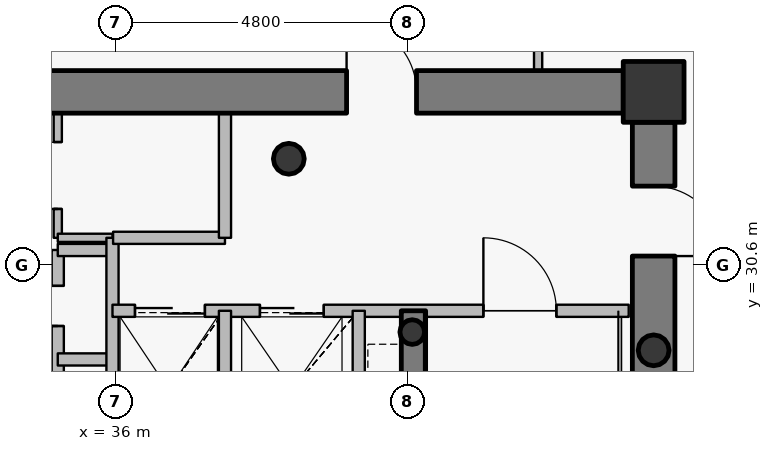
"""IFC4 building model, lengths in metres.
Left out: names, types, materials, properties, quantities, classifications, styles, units other than length and angle.
Written with IfcOpenShell. Run it as: python <this file> out.ifc"""

import sys

from ifc_helpers import new_model, si_unit, direction, frame, frame_2d, origin, origin_2d, place, context, subcontext, project, spatial, rectangle, hollow_circle, extrude, source, transform, mapped, element, fill, save


model = new_model("IFC4")
c1 = context("Model", 3, precision=1e-05, world=origin(), true_north=direction((0.0, 1.0)))
c2 = subcontext(c1, "Body", "Model", "MODEL_VIEW")
j1 = project(units=[si_unit("LENGTHUNIT", "METRE"), si_unit("PLANEANGLEUNIT", "RADIAN")], contexts=[c1])
p1 = place(None, origin())
s1 = spatial("IfcSite", under=j1, at=p1, CompositionType="ELEMENT")
p2 = place(p1, origin())
s2 = spatial("IfcBuilding", under=s1, at=p2, CompositionType="ELEMENT")
p3 = place(p2, frame((0.0, 0.0, 318.0)))
s3 = spatial("IfcBuildingStorey", under=s2, at=p3, CompositionType="ELEMENT", Elevation=318.0)
p4 = place(p3, frame((44.85, 33.45, 0.0), z_axis=(0.0, 0.0, 1.0), x_axis=(1.0, 0.0, 0.0)))
e1 = element("IfcColumn", 1, at=p4, inside=s3, PredefinedType="COLUMN", context=c2, shape_type="SweptSolid", body=[
    extrude(rectangle(XDim=1.0, YDim=1.0, at=origin_2d()), origin(), (0.0, 0.0, 1.0), 6.0),
])
p5 = place(p3, frame((38.85, 32.35, 0.0), z_axis=(0.0, 0.0, 1.0), x_axis=(1.0, 0.0, 0.0)))
e2 = element("IfcColumn", 2, at=p5, inside=s3, PredefinedType="COLUMN", context=c2, shape_type="SweptSolid", body=[
    extrude(hollow_circle(Radius=0.254, WallThickness=0.02, at=origin_2d()), origin(), (0.0, 0.0, 1.0), 6.0),
])
p6 = place(p3, frame((40.88, 29.5, 0.0), z_axis=(0.0, 0.0, 1.0), x_axis=(1.0, 0.0, 0.0)))
e3 = element("IfcColumn", 3, at=p6, inside=s3, PredefinedType="COLUMN", context=c2, shape_type="SweptSolid", body=[
    extrude(hollow_circle(Radius=0.203, WallThickness=0.016, at=origin_2d()), origin(), (0.0, 0.0, 1.0), 6.0),
])
p7 = place(p3, frame((27.65, 33.45, 0.0), z_axis=(0.0, 0.0, 1.0), x_axis=(1.0, 0.0, 0.0)))
e4 = element("IfcWall", 4, at=p7, inside=s3, PredefinedType="SHEAR", context=c2, shape_type="SweptSolid", body=[
    extrude(rectangle(XDim=16.7, YDim=0.7, at=frame_2d((8.35, 0.0))), origin(), (0.0, 0.0, 1.0), 5.3),
])
p8 = place(p7, frame((12.15, 0.0, 0.0)))
e5 = element("IfcOpeningElement", 5, at=p8, cuts=e4, PredefinedType="OPENING", context=c2, shape_type="SweptSolid", body=[
    extrude(rectangle(XDim=1.15, YDim=2.15, at=origin_2d()), frame((0.575, 0.36, 1.075), z_axis=(0.0, -1.0, 0.0), x_axis=(1.0, 0.0, 0.0)), (0.0, 0.0, 1.0), 0.72),
])
p9 = place(p3, frame((44.85, 32.95, 0.0), z_axis=(0.0, 0.0, 1.0), x_axis=(0.0, -1.0, 0.0)))
e6 = element("IfcWall", 6, at=p9, inside=s3, PredefinedType="SHEAR", context=c2, shape_type="SweptSolid", body=[
    extrude(rectangle(XDim=11.9, YDim=0.7, at=frame_2d((5.95, 0.0))), origin(), (0.0, 0.0, 1.0), 5.3),
])
p10 = place(p9, frame((1.05, 0.0, 0.0)))
e7 = element("IfcOpeningElement", 7, at=p10, cuts=e6, PredefinedType="OPENING", context=c2, shape_type="SweptSolid", body=[
    extrude(rectangle(XDim=1.15, YDim=2.15, at=origin_2d()), frame((0.575, 0.36, 1.075), z_axis=(0.0, -1.0, 0.0), x_axis=(1.0, 0.0, 0.0)), (0.0, 0.0, 1.0), 0.72),
])
p11 = place(p3, frame((40.9, 27.25, 0.0), z_axis=(0.0, 0.0, 1.0), x_axis=(0.0, 1.0, 0.0)))
e8 = element("IfcWall", 8, at=p11, inside=s3, PredefinedType="SHEAR", context=c2, shape_type="SweptSolid", body=[
    extrude(rectangle(XDim=2.6, YDim=0.4, at=frame_2d((1.3, 0.0))), origin(), (0.0, 0.0, 1.0), 5.35),
])
p12 = place(p3, frame((44.85, 29.2, 0.0), z_axis=(0.0, 0.0, 1.0), x_axis=(1.0, 0.0, 0.0)))
e9 = element("IfcColumn", 9, at=p12, inside=s3, PredefinedType="COLUMN", context=c2, shape_type="SweptSolid", body=[
    extrude(hollow_circle(Radius=0.254, WallThickness=0.02, at=origin_2d()), origin(), (0.0, 0.0, 1.0), 6.0),
])
p13 = place(p3, frame((35.05, 27.25, 0.0), z_axis=(0.0, 0.0, 1.0), x_axis=(0.0, 1.0, 0.0)))
e10 = element("IfcWall", 10, at=p13, inside=s3, PredefinedType="PARTITIONING", context=c2, shape_type="SweptSolid", body=[
    extrude(rectangle(XDim=3.6, YDim=0.2, at=frame_2d((1.8, 0.0))), origin(), (0.0, 0.0, 1.0), 5.75),
])
p14 = place(p13, frame((0.59, 0.0, 0.0)))
e11 = element("IfcOpeningElement", 11, at=p14, cuts=e10, PredefinedType="OPENING", context=c2, shape_type="SweptSolid", body=[
    extrude(rectangle(XDim=0.66, YDim=2.05, at=origin_2d()), frame((0.33, 0.11, 1.025), z_axis=(0.0, -1.0, 0.0), x_axis=(1.0, 0.0, 0.0)), (0.0, 0.0, 1.0), 0.22),
])
p15 = place(p13, frame((2.35, 0.0, 0.0)))
e12 = element("IfcOpeningElement", 12, at=p15, cuts=e10, PredefinedType="OPENING", context=c2, shape_type="SweptSolid", body=[
    extrude(rectangle(XDim=0.66, YDim=2.05, at=origin_2d()), frame((0.33, 0.11, 1.025), z_axis=(0.0, -1.0, 0.0), x_axis=(1.0, 0.0, 0.0)), (0.0, 0.0, 1.0), 0.22),
])
for number, where, z_axis, x_axis in (
    (13, (35.05, 29.05, 0.0), (0.0, 0.0, 1.0), (1.0, 0.0, 0.0)),
    (14, (35.05, 30.85, 0.0), (0.0, 0.0, 1.0), (1.0, 0.0, 0.0)),
):
    element("IfcWall", number, at=place(p3, frame(where, z_axis=z_axis, x_axis=x_axis)), inside=s3, PredefinedType="PARTITIONING", context=c2, shape_type="SweptSolid", body=[
        extrude(rectangle(XDim=0.9, YDim=0.2, at=frame_2d((0.45, 0.0))), origin(), (0.0, 0.0, 1.0), 5.75),
    ])
p16 = place(p3, frame((35.05, 31.05, 0.0), z_axis=(0.0, 0.0, 1.0), x_axis=(0.0, 1.0, 0.0)))
e15 = element("IfcWall", 15, at=p16, inside=s3, PredefinedType="PARTITIONING", context=c2, shape_type="SweptSolid", body=[
    extrude(rectangle(XDim=2.05, YDim=0.135, at=frame_2d((1.025, 0.0))), origin(), (0.0, 0.0, 1.0), 5.335),
])
p17 = place(p16, frame((0.475, 0.0, 0.0)))
e16 = element("IfcOpeningElement", 16, at=p17, cuts=e15, PredefinedType="OPENING", context=c2, shape_type="SweptSolid", body=[
    extrude(rectangle(XDim=1.1, YDim=2.15, at=origin_2d()), frame((0.55, 0.078, 1.075), z_axis=(0.0, -1.0, 0.0), x_axis=(1.0, 0.0, 0.0)), (0.0, 0.0, 1.0), 0.155),
])
p18 = place(p3, frame((35.05, 31.05, 0.0), z_axis=(0.0, 0.0, 1.0), x_axis=(1.0, 0.0, 0.0)))
e17 = element("IfcWall", 17, at=p18, inside=s3, PredefinedType="PARTITIONING", context=c2, shape_type="SweptSolid", body=[
    extrude(rectangle(XDim=0.9, YDim=0.135, at=frame_2d((0.45, 0.0))), origin(), (0.0, 0.0, 1.0), 5.75),
])
p19 = place(p3, frame((35.95, 27.25, 0.0), z_axis=(0.0, 0.0, 1.0), x_axis=(0.0, 1.0, 0.0)))
e18 = element("IfcWall", 18, at=p19, inside=s3, PredefinedType="PARTITIONING", context=c2, shape_type="SweptSolid", body=[
    extrude(rectangle(XDim=3.8, YDim=0.2, at=frame_2d((1.9, 0.0))), origin(), (0.0, 0.0, 1.0), 5.75),
])
p20 = place(p3, frame((35.95, 29.85, 0.0), z_axis=(0.0, 0.0, 1.0), x_axis=(1.0, 0.0, 0.0)))
e19 = element("IfcWall", 19, at=p20, inside=s3, PredefinedType="PARTITIONING", context=c2, shape_type="SweptSolid", body=[
    extrude(rectangle(XDim=8.49, YDim=0.2, at=frame_2d((4.245, 0.0))), origin(), (0.0, 0.0, 1.0), 5.335),
])
p21 = place(p20, frame((6.1, 0.0, 0.0)))
e20 = element("IfcOpeningElement", 20, at=p21, cuts=e19, PredefinedType="OPENING", context=c2, shape_type="SweptSolid", body=[
    extrude(rectangle(XDim=1.2, YDim=2.15, at=origin_2d()), frame((0.6, 0.11, 1.075), z_axis=(0.0, -1.0, 0.0), x_axis=(1.0, 0.0, 0.0)), (0.0, 0.0, 1.0), 0.22),
])
p22 = place(p20, frame((0.37, 0.0, 0.0)))
e21 = element("IfcOpeningElement", 21, at=p22, cuts=e19, PredefinedType="OPENING", context=c2, shape_type="SweptSolid", body=[
    extrude(rectangle(XDim=1.15, YDim=2.15, at=origin_2d()), frame((0.575, 0.11, 1.075), z_axis=(0.0, -1.0, 0.0), x_axis=(1.0, 0.0, 0.0)), (0.0, 0.0, 1.0), 0.22),
])
p23 = place(p20, frame((2.425, 0.0, 0.0)))
e22 = element("IfcOpeningElement", 22, at=p23, cuts=e19, PredefinedType="OPENING", context=c2, shape_type="SweptSolid", body=[
    extrude(rectangle(XDim=1.05, YDim=2.15, at=origin_2d()), frame((0.525, 0.11, 1.075), z_axis=(0.0, -1.0, 0.0), x_axis=(1.0, 0.0, 0.0)), (0.0, 0.0, 1.0), 0.22),
])
p24 = place(p3, frame((35.96, 31.05, 0.0), z_axis=(0.0, 0.0, 1.0), x_axis=(1.0, 0.0, 0.0)))
e23 = element("IfcWall", 23, at=p24, inside=s3, PredefinedType="PARTITIONING", context=c2, shape_type="SweptSolid", body=[
    extrude(rectangle(XDim=1.84, YDim=0.2, at=frame_2d((0.92, 0.0))), origin(), (0.0, 0.0, 1.0), 5.75),
])
p25 = place(p3, frame((37.8, 27.25, 0.0), z_axis=(0.0, 0.0, 1.0), x_axis=(0.0, 1.0, 0.0)))
e24 = element("IfcWall", 24, at=p25, inside=s3, PredefinedType="PARTITIONING", context=c2, shape_type="SweptSolid", body=[
    extrude(rectangle(XDim=2.6, YDim=0.2, at=frame_2d((1.3, 0.0))), origin(), (0.0, 0.0, 1.0), 5.75),
])
p26 = place(p3, frame((37.8, 31.05, 0.0), z_axis=(0.0, 0.0, 1.0), x_axis=(0.0, 1.0, 0.0)))
e25 = element("IfcWall", 25, at=p26, inside=s3, PredefinedType="PARTITIONING", context=c2, shape_type="SweptSolid", body=[
    extrude(rectangle(XDim=2.05, YDim=0.2, at=frame_2d((1.025, 0.0))), origin(), (0.0, 0.0, 1.0), 5.335),
])
p27 = place(p3, frame((40.0, 25.45, 0.0), z_axis=(0.0, 0.0, 1.0), x_axis=(0.0, 1.0, 0.0)))
e26 = element("IfcWall", 26, at=p27, inside=s3, PredefinedType="PARTITIONING", context=c2, shape_type="SweptSolid", body=[
    extrude(rectangle(XDim=4.4, YDim=0.2, at=frame_2d((2.2, 0.0))), origin(), (0.0, 0.0, 1.0), 5.75),
])
p28 = place(p3, frame((42.95, 33.8, 0.0), z_axis=(0.0, 0.0, 1.0), x_axis=(0.0, 1.0, 0.0)))
e27 = element("IfcWall", 27, at=p28, inside=s3, PredefinedType="PARTITIONING", context=c2, shape_type="SweptSolid", body=[
    extrude(rectangle(XDim=6.537, YDim=0.135, at=frame_2d((3.269, 0.0))), origin(), (0.0, 0.0, 1.0), 4.235),
])
p29 = place(p28, frame((0.92, 0.0, 0.0)))
e28 = element("IfcOpeningElement", 28, at=p29, cuts=e27, PredefinedType="OPENING", context=c2, shape_type="SweptSolid", body=[
    extrude(rectangle(XDim=1.1, YDim=2.15, at=origin_2d()), frame((0.55, 0.078, 1.075), z_axis=(0.0, -1.0, 0.0), x_axis=(1.0, 0.0, 0.0)), (0.0, 0.0, 1.0), 0.155),
])
p30 = place(p3, frame((45.2, 32.96, 0.0), z_axis=(0.0, 0.0, 1.0), x_axis=(0.0, 1.0, 0.0)))
e29 = element("IfcWall", 29, at=p30, inside=s3, PredefinedType="PARTITIONING", context=c2, shape_type="SweptSolid", body=[
    extrude(rectangle(XDim=0.84, YDim=0.135, at=frame_2d((0.42, 0.0))), origin(), (0.0, 0.0, 1.0), 2.832),
])
p31 = place(p3, frame((44.893, 33.8, 0.0), z_axis=(0.0, 0.0, 1.0), x_axis=(-1.0, 0.0, 0.0)))
e30 = element("IfcWall", 30, at=p31, inside=s3, PredefinedType="PARTITIONING", context=c2, shape_type="SweptSolid", body=[
    extrude(rectangle(XDim=0.532, YDim=0.135, at=frame_2d((0.266, 0.0))), origin(), (0.0, 0.0, 1.0), 4.235),
])
m1 = source(origin(), c2, "Body", "SweptSolid", [
    extrude(rectangle(XDim=1.15, YDim=2.15, at=origin_2d()), frame((0.575, 0.025, 1.075), z_axis=(0.0, -1.0, 0.0), x_axis=(1.0, 0.0, 0.0)), (0.0, 0.0, 1.0), 0.05),
])
p32 = place(p8, origin())
e31 = element("IfcDoor", 31, at=p32, inside=s3, OperationType="SINGLE_SWING_LEFT", PredefinedType="DOOR", context=c2, shape_type="MappedRepresentation", body=[
    mapped(m1, transform((0.0, 0.0, 0.0), x_axis=(1.0, 0.0, 0.0), y_axis=(0.0, 1.0, 0.0), z_axis=(0.0, 0.0, 1.0), scale=1.0)),
])
fill(e5, e31)
p33 = place(p10, origin())
e32 = element("IfcDoor", 32, at=p33, inside=s3, OperationType="SINGLE_SWING_RIGHT", PredefinedType="DOOR", context=c2, shape_type="MappedRepresentation", body=[
    mapped(m1, transform((0.0, 0.0, 0.0), x_axis=(1.0, 0.0, 0.0), y_axis=(0.0, 1.0, 0.0), z_axis=(0.0, 0.0, 1.0), scale=1.0)),
])
fill(e7, e32)
m2 = source(origin(), c2, "Body", "SweptSolid", [
    extrude(rectangle(XDim=1.2, YDim=2.15, at=origin_2d()), frame((0.6, 0.025, 1.075), z_axis=(0.0, -1.0, 0.0), x_axis=(1.0, 0.0, 0.0)), (0.0, 0.0, 1.0), 0.05),
])
p34 = place(p21, origin())
e33 = element("IfcDoor", 33, at=p34, inside=s3, OperationType="SINGLE_SWING_LEFT", PredefinedType="DOOR", context=c2, shape_type="MappedRepresentation", body=[
    mapped(m2, transform((0.0, 0.0, 0.0), x_axis=(1.0, 0.0, 0.0), y_axis=(0.0, 1.0, 0.0), z_axis=(0.0, 0.0, 1.0), scale=1.0)),
])
fill(e20, e33)
m3 = source(origin(), c2, "Body", "SweptSolid", [
    extrude(rectangle(XDim=1.15, YDim=2.15, at=origin_2d()), frame((0.575, 0.025, 1.075), z_axis=(0.0, -1.0, 0.0), x_axis=(1.0, 0.0, 0.0)), (0.0, 0.0, 1.0), 0.05),
])
p35 = place(p22, origin())
e34 = element("IfcDoor", 34, at=p35, inside=s3, OperationType="DOUBLE_DOOR_SLIDING", PredefinedType="USERDEFINED", context=c2, shape_type="MappedRepresentation", body=[
    mapped(m3, transform((0.0, 0.0, 0.0), x_axis=(1.0, 0.0, 0.0), y_axis=(0.0, 1.0, 0.0), z_axis=(0.0, 0.0, 1.0), scale=1.0)),
])
fill(e21, e34)
m4 = source(origin(), c2, "Body", "SweptSolid", [
    extrude(rectangle(XDim=1.05, YDim=2.15, at=origin_2d()), frame((0.525, 0.025, 1.075), z_axis=(0.0, -1.0, 0.0), x_axis=(1.0, 0.0, 0.0)), (0.0, 0.0, 1.0), 0.05),
])
p36 = place(p23, origin())
e35 = element("IfcDoor", 35, at=p36, inside=s3, OperationType="DOUBLE_DOOR_SLIDING", PredefinedType="USERDEFINED", context=c2, shape_type="MappedRepresentation", body=[
    mapped(m4, transform((0.0, 0.0, 0.0), x_axis=(1.0, 0.0, 0.0), y_axis=(0.0, 1.0, 0.0), z_axis=(0.0, 0.0, 1.0), scale=1.0)),
])
fill(e22, e35)
m5 = source(origin(), c2, "Body", "SweptSolid", [
    extrude(rectangle(XDim=0.66, YDim=2.05, at=origin_2d()), frame((0.33, 0.025, 1.025), z_axis=(0.0, -1.0, 0.0), x_axis=(1.0, 0.0, 0.0)), (0.0, 0.0, 1.0), 0.05),
])
p37 = place(p15, origin())
e36 = element("IfcDoor", 36, at=p37, inside=s3, OperationType="SINGLE_SWING_LEFT", PredefinedType="USERDEFINED", context=c2, shape_type="MappedRepresentation", body=[
    mapped(m5, transform((0.0, 0.0, 0.0), x_axis=(1.0, 0.0, 0.0), y_axis=(0.0, 1.0, 0.0), z_axis=(0.0, 0.0, 1.0), scale=1.0)),
])
fill(e12, e36)
m6 = source(origin(), c2, "Body", "SweptSolid", [
    extrude(rectangle(XDim=1.1, YDim=2.15, at=origin_2d()), frame((0.55, 0.025, 1.075), z_axis=(0.0, -1.0, 0.0), x_axis=(1.0, 0.0, 0.0)), (0.0, 0.0, 1.0), 0.05),
])
p38 = place(p17, origin())
e37 = element("IfcDoor", 37, at=p38, inside=s3, OperationType="SINGLE_SWING_LEFT", PredefinedType="DOOR", context=c2, shape_type="MappedRepresentation", body=[
    mapped(m6, transform((0.0, 0.0, 0.0), x_axis=(1.0, 0.0, 0.0), y_axis=(0.0, 1.0, 0.0), z_axis=(0.0, 0.0, 1.0), scale=1.0)),
])
fill(e16, e37)
save(model, sys.argv[1])
